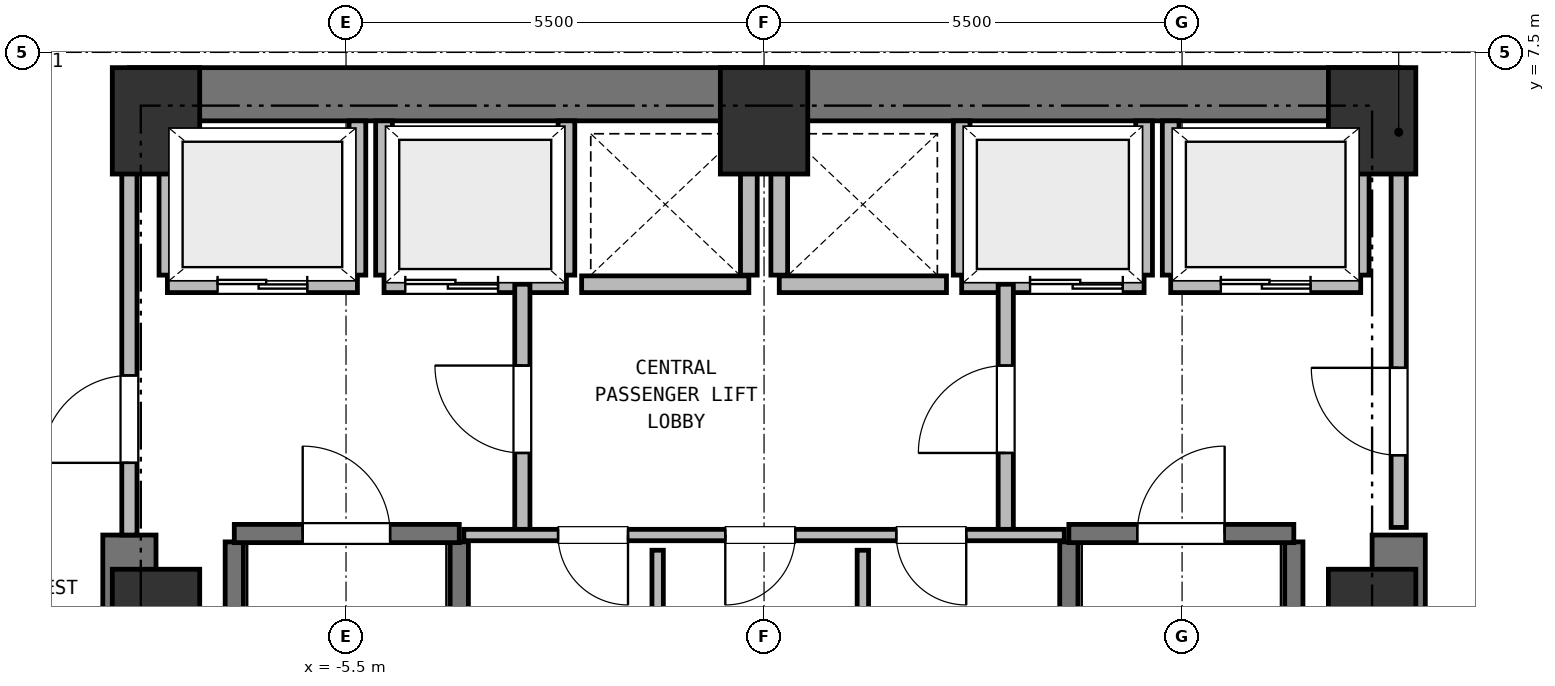
"""IFC4 building model, lengths in metres.
Left out: names, types, materials, properties, quantities, classifications, styles, units other than length and angle.
Written with IfcOpenShell. Run it as: python <this file> out.ifc"""

import sys

from ifc_helpers import new_model, si_unit, direction, frame, frame_2d, origin, origin_2d, place, context, subcontext, project, spatial, rectangle, extrude, element, fill, save


model = new_model("IFC4")
c1 = context("Model", 3, precision=1e-05, world=origin(), true_north=direction((0.0, 1.0)))
c2 = subcontext(c1, "Body", "Model", "MODEL_VIEW")
j1 = project(units=[si_unit("LENGTHUNIT", "METRE"), si_unit("PLANEANGLEUNIT", "RADIAN")], contexts=[c1])
p1 = place(None, origin())
s1 = spatial("IfcSite", under=j1, at=p1, CompositionType="ELEMENT")
p2 = place(p1, origin())
s2 = spatial("IfcBuilding", under=s1, at=p2, CompositionType="ELEMENT")
p3 = place(p2, frame((0.0, 0.0, 41.75)))
s3 = spatial("IfcBuildingStorey", under=s2, at=p3, CompositionType="ELEMENT", Elevation=41.75)
for number, where, z_axis, x_axis in (
    (1, (8.0, 0.0, 0.0), (0.0, 0.0, 1.0), (1.0, 0.0, 0.0)),
    (2, (8.0, 6.6, 0.0), (0.0, 0.0, 1.0), (1.0, 0.0, 0.0)),
    (3, (0.0, 6.6, 0.0), (0.0, 0.0, 1.0), (1.0, 0.0, 0.0)),
    (4, (-8.0, 6.6, 0.0), (0.0, 0.0, 1.0), (1.0, 0.0, 0.0)),
    (5, (-8.0, 0.0, 0.0), (0.0, 0.0, 1.0), (1.0, 0.0, 0.0)),
):
    element("IfcColumn", number, at=place(p3, frame(where, z_axis=z_axis, x_axis=x_axis)), inside=s3, PredefinedType="COLUMN", context=c2, shape_type="SweptSolid", body=[
        extrude(rectangle(XDim=1.15, YDim=1.4, at=origin_2d()), origin(), (0.0, 0.0, 1.0), 3.75),
    ])
p4 = place(p3, frame((-8.35, 6.95, 0.0), z_axis=(0.0, 0.0, 1.0), x_axis=(1.0, 0.0, 0.0)))
e6 = element("IfcWall", 6, at=p4, inside=s3, PredefinedType="SHEAR", context=c2, shape_type="SweptSolid", body=[
    extrude(rectangle(XDim=16.7, YDim=0.7, at=frame_2d((8.35, 0.0))), origin(), (0.0, 0.0, 1.0), 3.5),
])
for number, where, z_axis, x_axis in (
    (7, (-8.35, -6.95, 0.0), (0.0, 0.0, 1.0), (0.0, 1.0, 0.0)),
    (8, (8.35, -6.95, 0.0), (0.0, 0.0, 1.0), (0.0, 1.0, 0.0)),
):
    element("IfcWall", number, at=place(p3, frame(where, z_axis=z_axis, x_axis=x_axis)), inside=s3, PredefinedType="SHEAR", context=c2, shape_type="SweptSolid", body=[
        extrude(rectangle(XDim=8.1, YDim=0.7, at=frame_2d((4.05, 0.0))), origin(), (0.0, 0.0, 1.0), 3.5),
    ])
for number, where, z_axis, x_axis in (
    (9, (-6.97, -6.16, 0.0), (0.0, 0.0, 1.0), (0.0, 1.0, 0.0)),
    (10, (-4.01, -6.16, 0.0), (0.0, 0.0, 1.0), (0.0, 1.0, 0.0)),
):
    element("IfcWall", number, at=place(p3, frame(where, z_axis=z_axis, x_axis=x_axis)), inside=s3, PredefinedType="SHEAR", context=c2, shape_type="SweptSolid", body=[
        extrude(rectangle(XDim=7.22, YDim=0.24, at=frame_2d((3.61, 0.0))), origin(), (0.0, 0.0, 1.0), 3.5),
    ])
p5 = place(p3, frame((-6.97, 1.17, 0.0), z_axis=(0.0, 0.0, 1.0), x_axis=(1.0, 0.0, 0.0)))
e11 = element("IfcWall", 11, at=p5, inside=s3, PredefinedType="SHEAR", context=c2, shape_type="SweptSolid", body=[
    extrude(rectangle(XDim=2.96, YDim=0.24, at=frame_2d((1.48, 0.0))), origin(), (0.0, 0.0, 1.0), 3.5),
])
p6 = place(p5, frame((0.9, 0.0, 0.0)))
e12 = element("IfcOpeningElement", 12, at=p6, cuts=e11, PredefinedType="OPENING", context=c2, shape_type="SweptSolid", body=[
    extrude(rectangle(XDim=1.15, YDim=2.15, at=frame_2d((0.575, 1.075))), frame((0.0, 0.13, 0.0), z_axis=(0.0, -1.0, 0.0), x_axis=(1.0, 0.0, 0.0)), (0.0, 0.0, 1.0), 0.26),
])
for number, where, z_axis, x_axis in (
    (13, (4.01, -6.16, 0.0), (0.0, 0.0, 1.0), (0.0, 1.0, 0.0)),
    (14, (6.97, -6.16, 0.0), (0.0, 0.0, 1.0), (0.0, 1.0, 0.0)),
):
    element("IfcWall", number, at=place(p3, frame(where, z_axis=z_axis, x_axis=x_axis)), inside=s3, PredefinedType="SHEAR", context=c2, shape_type="SweptSolid", body=[
        extrude(rectangle(XDim=7.22, YDim=0.24, at=frame_2d((3.61, 0.0))), origin(), (0.0, 0.0, 1.0), 3.5),
    ])
p7 = place(p3, frame((4.01, 1.17, 0.0), z_axis=(0.0, 0.0, 1.0), x_axis=(1.0, 0.0, 0.0)))
e15 = element("IfcWall", 15, at=p7, inside=s3, PredefinedType="SHEAR", context=c2, shape_type="SweptSolid", body=[
    extrude(rectangle(XDim=2.96, YDim=0.24, at=frame_2d((1.48, 0.0))), origin(), (0.0, 0.0, 1.0), 3.5),
])
p8 = place(p7, frame((0.9, 0.0, 0.0)))
e16 = element("IfcOpeningElement", 16, at=p8, cuts=e15, PredefinedType="OPENING", context=c2, shape_type="SweptSolid", body=[
    extrude(rectangle(XDim=1.15, YDim=2.15, at=frame_2d((0.575, 1.075))), frame((0.0, 0.13, 0.0), z_axis=(0.0, -1.0, 0.0), x_axis=(1.0, 0.0, 0.0)), (0.0, 0.0, 1.0), 0.26),
])
p9 = place(p3, frame((-7.85, 4.45, 0.0), z_axis=(0.0, 0.0, 1.0), x_axis=(1.0, 0.0, 0.0)))
e17 = element("IfcWall", 17, at=p9, inside=s3, PredefinedType="PARTITIONING", context=c2, shape_type="SweptSolid", body=[
    extrude(rectangle(XDim=2.5, YDim=0.22, at=frame_2d((1.25, 0.0))), origin(), (0.0, 0.0, 1.0), 3.5),
])
p10 = place(p9, frame((0.66, 0.0, 0.0)))
e18 = element("IfcOpeningElement", 18, at=p10, cuts=e17, PredefinedType="OPENING", context=c2, shape_type="SweptSolid", body=[
    extrude(rectangle(XDim=1.18, YDim=2.15, at=frame_2d((0.59, 1.075))), frame((0.0, 0.12, 0.0), z_axis=(0.0, -1.0, 0.0), x_axis=(1.0, 0.0, 0.0)), (0.0, 0.0, 1.0), 0.24),
])
p11 = place(p3, frame((-7.85, 4.57, 0.0), z_axis=(0.0, 0.0, 1.0), x_axis=(0.0, 1.0, 0.0)))
e19 = element("IfcWall", 19, at=p11, inside=s3, PredefinedType="PARTITIONING", context=c2, shape_type="SweptSolid", body=[
    extrude(rectangle(XDim=2.03, YDim=0.22, at=frame_2d((1.015, 0.0))), origin(), (0.0, 0.0, 1.0), 3.08),
])
p12 = place(p3, frame((-5.35, 4.57, 0.0), z_axis=(0.0, 0.0, 1.0), x_axis=(0.0, 1.0, 0.0)))
e20 = element("IfcWall", 20, at=p12, inside=s3, PredefinedType="PARTITIONING", context=c2, shape_type="SweptSolid", body=[
    extrude(rectangle(XDim=2.03, YDim=0.22, at=frame_2d((1.015, 0.0))), origin(), (0.0, 0.0, 1.0), 3.5),
])
p13 = place(p3, frame((5.35, 4.45, 0.0), z_axis=(0.0, 0.0, 1.0), x_axis=(1.0, 0.0, 0.0)))
e21 = element("IfcWall", 21, at=p13, inside=s3, PredefinedType="PARTITIONING", context=c2, shape_type="SweptSolid", body=[
    extrude(rectangle(XDim=2.5, YDim=0.22, at=frame_2d((1.25, 0.0))), origin(), (0.0, 0.0, 1.0), 3.5),
])
p14 = place(p13, frame((0.66, 0.0, 0.0)))
e22 = element("IfcOpeningElement", 22, at=p14, cuts=e21, PredefinedType="OPENING", context=c2, shape_type="SweptSolid", body=[
    extrude(rectangle(XDim=1.18, YDim=2.15, at=frame_2d((0.59, 1.075))), frame((0.0, 0.12, 0.0), z_axis=(0.0, -1.0, 0.0), x_axis=(1.0, 0.0, 0.0)), (0.0, 0.0, 1.0), 0.24),
])
p15 = place(p3, frame((5.35, 4.57, 0.0), z_axis=(0.0, 0.0, 1.0), x_axis=(0.0, 1.0, 0.0)))
e23 = element("IfcWall", 23, at=p15, inside=s3, PredefinedType="PARTITIONING", context=c2, shape_type="SweptSolid", body=[
    extrude(rectangle(XDim=2.03, YDim=0.22, at=frame_2d((1.015, 0.0))), origin(), (0.0, 0.0, 1.0), 3.5),
])
p16 = place(p3, frame((7.85, 4.57, 0.0), z_axis=(0.0, 0.0, 1.0), x_axis=(0.0, 1.0, 0.0)))
e24 = element("IfcWall", 24, at=p16, inside=s3, PredefinedType="PARTITIONING", context=c2, shape_type="SweptSolid", body=[
    extrude(rectangle(XDim=2.03, YDim=0.22, at=frame_2d((1.015, 0.0))), origin(), (0.0, 0.0, 1.0), 3.08),
])
p17 = place(p3, frame((-5.0, 4.45, 0.0), z_axis=(0.0, 0.0, 1.0), x_axis=(1.0, 0.0, 0.0)))
e25 = element("IfcWall", 25, at=p17, inside=s3, PredefinedType="PARTITIONING", context=c2, shape_type="SweptSolid", body=[
    extrude(rectangle(XDim=2.4, YDim=0.22, at=frame_2d((1.2, 0.0))), origin(), (0.0, 0.0, 1.0), 3.5),
])
p18 = place(p17, frame((0.28, 0.0, 0.0)))
e26 = element("IfcOpeningElement", 26, at=p18, cuts=e25, PredefinedType="OPENING", context=c2, shape_type="SweptSolid", body=[
    extrude(rectangle(XDim=1.22, YDim=2.15, at=frame_2d((0.61, 1.075))), frame((0.0, 0.12, 0.0), z_axis=(0.0, -1.0, 0.0), x_axis=(1.0, 0.0, 0.0)), (0.0, 0.0, 1.0), 0.24),
])
for number, where, z_axis, x_axis in (
    (27, (-5.0, 4.57, 0.0), (0.0, 0.0, 1.0), (0.0, 1.0, 0.0)),
    (28, (-2.6, 4.57, 0.0), (0.0, 0.0, 1.0), (0.0, 1.0, 0.0)),
):
    element("IfcWall", number, at=place(p3, frame(where, z_axis=z_axis, x_axis=x_axis)), inside=s3, PredefinedType="PARTITIONING", context=c2, shape_type="SweptSolid", body=[
        extrude(rectangle(XDim=2.03, YDim=0.22, at=frame_2d((1.015, 0.0))), origin(), (0.0, 0.0, 1.0), 3.5),
    ])
p19 = place(p3, frame((2.6, 4.45, 0.0), z_axis=(0.0, 0.0, 1.0), x_axis=(1.0, 0.0, 0.0)))
e29 = element("IfcWall", 29, at=p19, inside=s3, PredefinedType="PARTITIONING", context=c2, shape_type="SweptSolid", body=[
    extrude(rectangle(XDim=2.4, YDim=0.22, at=frame_2d((1.2, 0.0))), origin(), (0.0, 0.0, 1.0), 3.5),
])
p20 = place(p19, frame((0.9, 0.0, 0.0)))
e30 = element("IfcOpeningElement", 30, at=p20, cuts=e29, PredefinedType="OPENING", context=c2, shape_type="SweptSolid", body=[
    extrude(rectangle(XDim=1.22, YDim=2.15, at=frame_2d((0.61, 1.075))), frame((0.0, 0.12, 0.0), z_axis=(0.0, -1.0, 0.0), x_axis=(1.0, 0.0, 0.0)), (0.0, 0.0, 1.0), 0.24),
])
for number, where, z_axis, x_axis in (
    (31, (2.6, 4.57, 0.0), (0.0, 0.0, 1.0), (0.0, 1.0, 0.0)),
    (32, (5.0, 4.57, 0.0), (0.0, 0.0, 1.0), (0.0, 1.0, 0.0)),
):
    element("IfcWall", number, at=place(p3, frame(where, z_axis=z_axis, x_axis=x_axis)), inside=s3, PredefinedType="PARTITIONING", context=c2, shape_type="SweptSolid", body=[
        extrude(rectangle(XDim=2.03, YDim=0.22, at=frame_2d((1.015, 0.0))), origin(), (0.0, 0.0, 1.0), 3.5),
    ])
p21 = place(p3, frame((-2.4, 4.45, 0.0), z_axis=(0.0, 0.0, 1.0), x_axis=(1.0, 0.0, 0.0)))
e33 = element("IfcWall", 33, at=p21, inside=s3, PredefinedType="PARTITIONING", context=c2, shape_type="SweptSolid", body=[
    extrude(rectangle(XDim=2.2, YDim=0.22, at=frame_2d((1.1, 0.0))), origin(), (0.0, 0.0, 1.0), 3.5),
])
p22 = place(p3, frame((-0.2, 4.57, 0.0), z_axis=(0.0, 0.0, 1.0), x_axis=(0.0, 1.0, 0.0)))
e34 = element("IfcWall", 34, at=p22, inside=s3, PredefinedType="PARTITIONING", context=c2, shape_type="SweptSolid", body=[
    extrude(rectangle(XDim=2.03, YDim=0.22, at=frame_2d((1.015, 0.0))), origin(), (0.0, 0.0, 1.0), 3.5),
])
p23 = place(p3, frame((0.2, 4.45, 0.0), z_axis=(0.0, 0.0, 1.0), x_axis=(1.0, 0.0, 0.0)))
e35 = element("IfcWall", 35, at=p23, inside=s3, PredefinedType="PARTITIONING", context=c2, shape_type="SweptSolid", body=[
    extrude(rectangle(XDim=2.2, YDim=0.22, at=frame_2d((1.1, 0.0))), origin(), (0.0, 0.0, 1.0), 3.5),
])
p24 = place(p3, frame((0.2, 4.57, 0.0), z_axis=(0.0, 0.0, 1.0), x_axis=(0.0, 1.0, 0.0)))
e36 = element("IfcWall", 36, at=p24, inside=s3, PredefinedType="PARTITIONING", context=c2, shape_type="SweptSolid", body=[
    extrude(rectangle(XDim=2.03, YDim=0.22, at=frame_2d((1.015, 0.0))), origin(), (0.0, 0.0, 1.0), 3.5),
])
p25 = place(p3, frame((-3.18, 1.15, 0.0), z_axis=(0.0, 0.0, 1.0), x_axis=(0.0, 1.0, 0.0)))
e37 = element("IfcWall", 37, at=p25, inside=s3, PredefinedType="PARTITIONING", context=c2, shape_type="SweptSolid", body=[
    extrude(rectangle(XDim=3.3, YDim=0.2, at=frame_2d((1.65, 0.0))), origin(), (0.0, 0.0, 1.0), 3.5),
])
p26 = place(p25, frame((1.08, 0.0, 0.0)))
e38 = element("IfcOpeningElement", 38, at=p26, cuts=e37, PredefinedType="OPENING", context=c2, shape_type="SweptSolid", body=[
    extrude(rectangle(XDim=1.15, YDim=2.15, at=frame_2d((0.575, 1.075))), frame((0.0, 0.11, 0.0), z_axis=(0.0, -1.0, 0.0), x_axis=(1.0, 0.0, 0.0)), (0.0, 0.0, 1.0), 0.22),
])
p27 = place(p3, frame((3.18, 1.15, 0.0), z_axis=(0.0, 0.0, 1.0), x_axis=(0.0, 1.0, 0.0)))
e39 = element("IfcWall", 39, at=p27, inside=s3, PredefinedType="PARTITIONING", context=c2, shape_type="SweptSolid", body=[
    extrude(rectangle(XDim=3.3, YDim=0.2, at=frame_2d((1.65, 0.0))), origin(), (0.0, 0.0, 1.0), 3.5),
])
p28 = place(p27, frame((1.08, 0.0, 0.0)))
e40 = element("IfcOpeningElement", 40, at=p28, cuts=e39, PredefinedType="OPENING", context=c2, shape_type="SweptSolid", body=[
    extrude(rectangle(XDim=1.15, YDim=2.15, at=frame_2d((0.575, 1.075))), frame((0.0, 0.11, 0.0), z_axis=(0.0, -1.0, 0.0), x_axis=(1.0, 0.0, 0.0)), (0.0, 0.0, 1.0), 0.22),
])
p29 = place(p3, frame((-8.35, 1.15, 0.0), z_axis=(0.0, 0.0, 1.0), x_axis=(0.0, 1.0, 0.0)))
e41 = element("IfcWall", 41, at=p29, inside=s3, PredefinedType="PARTITIONING", context=c2, shape_type="SweptSolid", body=[
    extrude(rectangle(XDim=5.4, YDim=0.2, at=frame_2d((2.7, 0.0))), origin(), (0.0, 0.0, 1.0), 3.5),
])
p30 = place(p29, frame((0.95, 0.0, 0.0)))
e42 = element("IfcOpeningElement", 42, at=p30, cuts=e41, PredefinedType="OPENING", context=c2, shape_type="SweptSolid", body=[
    extrude(rectangle(XDim=1.15, YDim=2.15, at=frame_2d((0.575, 1.075))), frame((0.0, 0.11, 0.0), z_axis=(0.0, -1.0, 0.0), x_axis=(1.0, 0.0, 0.0)), (0.0, 0.0, 1.0), 0.22),
])
p31 = place(p3, frame((8.35, 1.25, 0.0), z_axis=(0.0, 0.0, 1.0), x_axis=(0.0, 1.0, 0.0)))
e43 = element("IfcWall", 43, at=p31, inside=s3, PredefinedType="PARTITIONING", context=c2, shape_type="SweptSolid", body=[
    extrude(rectangle(XDim=5.3, YDim=0.2, at=frame_2d((2.65, 0.0))), origin(), (0.0, 0.0, 1.0), 3.5),
])
p32 = place(p31, frame((0.95, 0.0, 0.0)))
e44 = element("IfcOpeningElement", 44, at=p32, cuts=e43, PredefinedType="OPENING", context=c2, shape_type="SweptSolid", body=[
    extrude(rectangle(XDim=1.15, YDim=2.15, at=frame_2d((0.575, 1.075))), frame((0.0, 0.11, 0.0), z_axis=(0.0, -1.0, 0.0), x_axis=(1.0, 0.0, 0.0)), (0.0, 0.0, 1.0), 0.22),
])
p33 = place(p3, frame((3.95, 1.15, 0.0), z_axis=(0.0, 0.0, 1.0), x_axis=(-1.0, 0.0, 0.0)))
e45 = element("IfcWall", 45, at=p33, inside=s3, PredefinedType="PARTITIONING", context=c2, shape_type="SweptSolid", body=[
    extrude(rectangle(XDim=7.9, YDim=0.15, at=frame_2d((3.95, 0.0))), origin(), (0.0, 0.0, 1.0), 3.5),
])
p34 = place(p33, frame((5.74, 0.0, 0.0)))
e46 = element("IfcOpeningElement", 46, at=p34, cuts=e45, PredefinedType="OPENING", context=c2, shape_type="SweptSolid", body=[
    extrude(rectangle(XDim=0.92, YDim=2.05, at=frame_2d((0.46, 1.025))), frame((0.0, 0.085, 0.0), z_axis=(0.0, -1.0, 0.0), x_axis=(1.0, 0.0, 0.0)), (0.0, 0.0, 1.0), 0.17),
])
p35 = place(p33, frame((3.54, 0.0, 0.0)))
e47 = element("IfcOpeningElement", 47, at=p35, cuts=e45, PredefinedType="OPENING", context=c2, shape_type="SweptSolid", body=[
    extrude(rectangle(XDim=0.92, YDim=2.05, at=frame_2d((0.46, 1.025))), frame((0.0, 0.085, 0.0), z_axis=(0.0, -1.0, 0.0), x_axis=(1.0, 0.0, 0.0)), (0.0, 0.0, 1.0), 0.17),
])
p36 = place(p33, frame((1.29, 0.0, 0.0)))
e48 = element("IfcOpeningElement", 48, at=p36, cuts=e45, PredefinedType="OPENING", context=c2, shape_type="SweptSolid", body=[
    extrude(rectangle(XDim=0.92, YDim=2.05, at=frame_2d((0.46, 1.025))), frame((0.0, 0.085, 0.0), z_axis=(0.0, -1.0, 0.0), x_axis=(1.0, 0.0, 0.0)), (0.0, 0.0, 1.0), 0.17),
])
for number, where, z_axis, x_axis in (
    (49, (-1.4, -4.08, 0.0), (0.0, 0.0, 1.0), (0.0, 1.0, 0.0)),
    (50, (1.3, -4.08, 0.0), (0.0, 0.0, 1.0), (0.0, 1.0, 0.0)),
):
    element("IfcWall", number, at=place(p3, frame(where, z_axis=z_axis, x_axis=x_axis)), inside=s3, PredefinedType="PARTITIONING", context=c2, shape_type="SweptSolid", body=[
        extrude(rectangle(XDim=5.03, YDim=0.15, at=frame_2d((2.515, 0.0))), origin(), (0.0, 0.0, 1.0), 3.5),
    ])
p37 = place(p3, frame((8.578, 9.352, 0.0), z_axis=(0.0, 0.0, 1.0), x_axis=(0.707067066127, -0.707146494016, 0.0)))
e51 = element("IfcWall", 51, at=p37, inside=s3, PredefinedType="PARTITIONING", context=c2, shape_type="SweptSolid", body=[
    extrude(rectangle(XDim=3.074, YDim=0.15, at=frame_2d((1.537, 0.0))), origin(), (0.0, 0.0, 1.0), 3.5),
])
p38 = place(p3, frame((-10.752, 7.178, 0.0), z_axis=(0.0, 0.0, 1.0), x_axis=(0.707067066127, 0.707146494016, 0.0)))
e52 = element("IfcWall", 52, at=p38, inside=s3, PredefinedType="PARTITIONING", context=c2, shape_type="SweptSolid", body=[
    extrude(rectangle(XDim=3.074, YDim=0.15, at=frame_2d((1.537, 0.0))), origin(), (0.0, 0.0, 1.0), 3.5),
])
p39 = place(p38, frame((1.077, 0.0, 0.0)))
e53 = element("IfcOpeningElement", 53, at=p39, cuts=e52, PredefinedType="OPENING", context=c2, shape_type="SweptSolid", body=[
    extrude(rectangle(XDim=1.0, YDim=2.15, at=frame_2d((0.5, 1.075))), frame((0.0, 0.085, 0.0), z_axis=(0.0, -1.0, 0.0), x_axis=(1.0, 0.0, 0.0)), (0.0, 0.0, 1.0), 0.17),
])
p40 = place(p6, origin())
e54 = element("IfcDoor", 54, at=p40, inside=s3, OperationType="SINGLE_SWING_LEFT", PredefinedType="DOOR", context=c2, shape_type="SweptSolid", body=[
    extrude(rectangle(XDim=1.15, YDim=2.15, at=frame_2d((0.575, 1.075))), frame((0.0, 0.025, 0.0), z_axis=(0.0, -1.0, 0.0), x_axis=(1.0, 0.0, 0.0)), (0.0, 0.0, 1.0), 0.05),
])
fill(e12, e54)
p41 = place(p8, origin())
e55 = element("IfcDoor", 55, at=p41, inside=s3, OperationType="SINGLE_SWING_RIGHT", PredefinedType="DOOR", context=c2, shape_type="SweptSolid", body=[
    extrude(rectangle(XDim=1.15, YDim=2.15, at=frame_2d((0.575, 1.075))), frame((0.0, 0.025, 0.0), z_axis=(0.0, -1.0, 0.0), x_axis=(1.0, 0.0, 0.0)), (0.0, 0.0, 1.0), 0.05),
])
fill(e16, e55)
p42 = place(p10, origin())
e56 = element("IfcDoor", 56, at=p42, inside=s3, OperationType="DOUBLE_DOOR_SLIDING", PredefinedType="DOOR", context=c2, shape_type="SweptSolid", body=[
    extrude(rectangle(XDim=1.18, YDim=2.15, at=frame_2d((0.59, 1.075))), frame((0.0, 0.025, 0.0), z_axis=(0.0, -1.0, 0.0), x_axis=(1.0, 0.0, 0.0)), (0.0, 0.0, 1.0), 0.05),
])
fill(e18, e56)
p43 = place(p14, origin())
e57 = element("IfcDoor", 57, at=p43, inside=s3, OperationType="DOUBLE_DOOR_SLIDING", PredefinedType="DOOR", context=c2, shape_type="SweptSolid", body=[
    extrude(rectangle(XDim=1.18, YDim=2.15, at=frame_2d((0.59, 1.075))), frame((0.0, 0.025, 0.0), z_axis=(0.0, -1.0, 0.0), x_axis=(1.0, 0.0, 0.0)), (0.0, 0.0, 1.0), 0.05),
])
fill(e22, e57)
p44 = place(p18, origin())
e58 = element("IfcDoor", 58, at=p44, inside=s3, OperationType="DOUBLE_DOOR_SLIDING", PredefinedType="DOOR", context=c2, shape_type="SweptSolid", body=[
    extrude(rectangle(XDim=1.22, YDim=2.15, at=frame_2d((0.61, 1.075))), frame((0.0, 0.025, 0.0), z_axis=(0.0, -1.0, 0.0), x_axis=(1.0, 0.0, 0.0)), (0.0, 0.0, 1.0), 0.05),
])
fill(e26, e58)
p45 = place(p20, origin())
e59 = element("IfcDoor", 59, at=p45, inside=s3, OperationType="DOUBLE_DOOR_SLIDING", PredefinedType="DOOR", context=c2, shape_type="SweptSolid", body=[
    extrude(rectangle(XDim=1.22, YDim=2.15, at=frame_2d((0.61, 1.075))), frame((0.0, 0.025, 0.0), z_axis=(0.0, -1.0, 0.0), x_axis=(1.0, 0.0, 0.0)), (0.0, 0.0, 1.0), 0.05),
])
fill(e30, e59)
p46 = place(p26, origin())
e60 = element("IfcDoor", 60, at=p46, inside=s3, OperationType="SINGLE_SWING_RIGHT", PredefinedType="DOOR", context=c2, shape_type="SweptSolid", body=[
    extrude(rectangle(XDim=1.15, YDim=2.15, at=frame_2d((0.575, 1.075))), frame((0.0, 0.025, 0.0), z_axis=(0.0, -1.0, 0.0), x_axis=(1.0, 0.0, 0.0)), (0.0, 0.0, 1.0), 0.05),
])
fill(e38, e60)
p47 = place(p28, origin())
e61 = element("IfcDoor", 61, at=p47, inside=s3, OperationType="SINGLE_SWING_LEFT", PredefinedType="DOOR", context=c2, shape_type="SweptSolid", body=[
    extrude(rectangle(XDim=1.15, YDim=2.15, at=frame_2d((0.575, 1.075))), frame((0.0, 0.025, 0.0), z_axis=(0.0, -1.0, 0.0), x_axis=(1.0, 0.0, 0.0)), (0.0, 0.0, 1.0), 0.05),
])
fill(e40, e61)
p48 = place(p30, origin())
e62 = element("IfcDoor", 62, at=p48, inside=s3, OperationType="SINGLE_SWING_LEFT", PredefinedType="DOOR", context=c2, shape_type="SweptSolid", body=[
    extrude(rectangle(XDim=1.15, YDim=2.15, at=frame_2d((0.575, 1.075))), frame((0.0, 0.025, 0.0), z_axis=(0.0, -1.0, 0.0), x_axis=(1.0, 0.0, 0.0)), (0.0, 0.0, 1.0), 0.05),
])
fill(e42, e62)
p49 = place(p32, origin())
e63 = element("IfcDoor", 63, at=p49, inside=s3, OperationType="SINGLE_SWING_RIGHT", PredefinedType="DOOR", context=c2, shape_type="SweptSolid", body=[
    extrude(rectangle(XDim=1.15, YDim=2.15, at=frame_2d((0.575, 1.075))), frame((0.0, 0.025, 0.0), z_axis=(0.0, -1.0, 0.0), x_axis=(1.0, 0.0, 0.0)), (0.0, 0.0, 1.0), 0.05),
])
fill(e44, e63)
p50 = place(p34, origin())
e64 = element("IfcDoor", 64, at=p50, inside=s3, OperationType="SINGLE_SWING_LEFT", PredefinedType="DOOR", context=c2, shape_type="SweptSolid", body=[
    extrude(rectangle(XDim=0.92, YDim=2.05, at=frame_2d((0.46, 1.025))), frame((0.0, 0.025, 0.0), z_axis=(0.0, -1.0, 0.0), x_axis=(1.0, 0.0, 0.0)), (0.0, 0.0, 1.0), 0.05),
])
fill(e46, e64)
p51 = place(p35, origin())
e65 = element("IfcDoor", 65, at=p51, inside=s3, OperationType="SINGLE_SWING_RIGHT", PredefinedType="DOOR", context=c2, shape_type="SweptSolid", body=[
    extrude(rectangle(XDim=0.92, YDim=2.05, at=frame_2d((0.46, 1.025))), frame((0.0, 0.025, 0.0), z_axis=(0.0, -1.0, 0.0), x_axis=(1.0, 0.0, 0.0)), (0.0, 0.0, 1.0), 0.05),
])
fill(e47, e65)
p52 = place(p36, origin())
e66 = element("IfcDoor", 66, at=p52, inside=s3, OperationType="SINGLE_SWING_LEFT", PredefinedType="DOOR", context=c2, shape_type="SweptSolid", body=[
    extrude(rectangle(XDim=0.92, YDim=2.05, at=frame_2d((0.46, 1.025))), frame((0.0, 0.025, 0.0), z_axis=(0.0, -1.0, 0.0), x_axis=(1.0, 0.0, 0.0)), (0.0, 0.0, 1.0), 0.05),
])
fill(e48, e66)
save(model, sys.argv[1])
